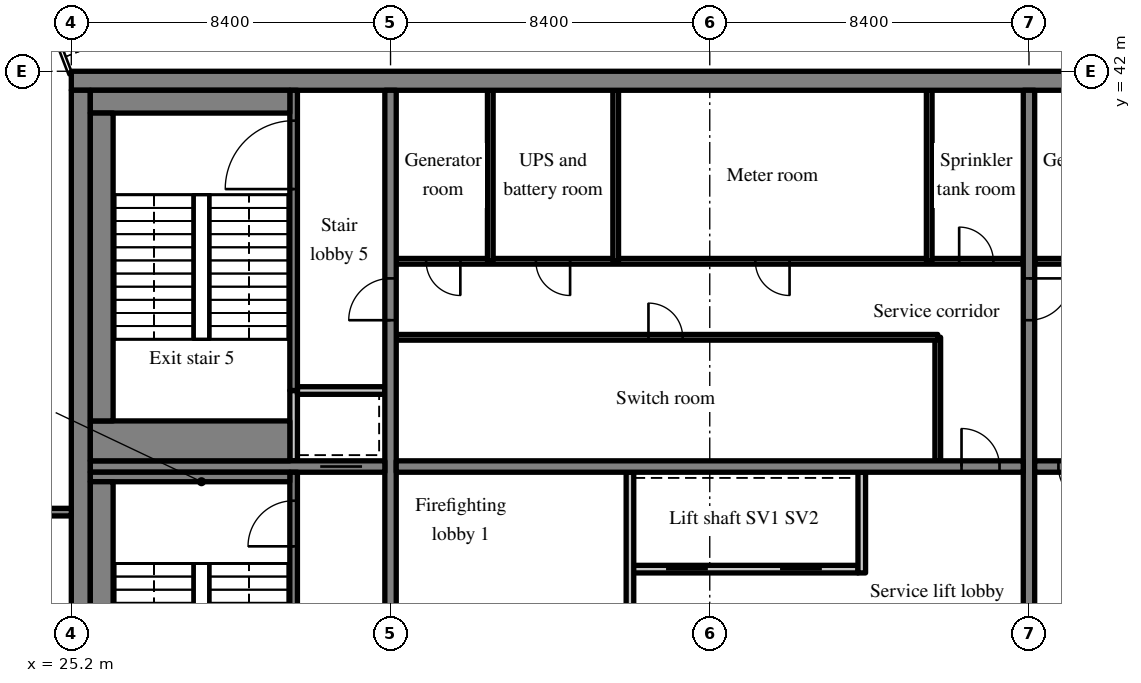
"""IFC4 building model, lengths in metres.
Left out: names, types, materials, properties, quantities, classifications, styles, units other than length and angle.
Written with IfcOpenShell. Run it as: python <this file> out.ifc"""

import sys

from ifc_helpers import new_model, si_unit, direction, frame, frame_2d, origin, place, context, subcontext, project, spatial, rectangle, extrude, source, transform, mapped, element, fill, save


model = new_model("IFC4")
c1 = context("Model", 3, precision=1e-05, world=origin(), true_north=direction((0.0, 1.0)))
c2 = subcontext(c1, "Body", "Model", "MODEL_VIEW")
j1 = project(units=[si_unit("LENGTHUNIT", "METRE"), si_unit("PLANEANGLEUNIT", "RADIAN")], contexts=[c1])
p1 = place(None, origin())
s1 = spatial("IfcSite", under=j1, at=p1, CompositionType="ELEMENT")
p2 = place(p1, origin())
s2 = spatial("IfcBuilding", under=s1, at=p2, CompositionType="ELEMENT")
p3 = place(p2, frame((0.0, 0.0, 317.7)))
s3 = spatial("IfcBuildingStorey", under=s2, at=p3, CompositionType="ELEMENT", Elevation=317.7)
m1 = source(origin(), c2, "Body", "SweptSolid", [
    extrude(rectangle(XDim=50.4, YDim=0.5, at=frame_2d((25.2, 0.0))), origin(), (0.0, 0.0, 1.0), 5.72),
])
p4 = place(p3, frame((25.2, 41.75, 0.0), z_axis=(0.0, 0.0, 1.0), x_axis=(1.0, 0.0, 0.0)))
e1 = element("IfcWall", 1, at=p4, inside=s3, PredefinedType="SHEAR", context=c2, shape_type="MappedRepresentation", body=[
    mapped(m1, transform((0.0, 0.0, 0.0), scale=1.0)),
])
m2 = source(origin(), c2, "Body", "SweptSolid", [
    extrude(rectangle(XDim=19.0, YDim=0.5, at=frame_2d((9.5, 0.0))), origin(), (0.0, 0.0, 1.0), 5.72),
])
p5 = place(p3, frame((25.45, 22.5, 0.0), z_axis=(0.0, 0.0, 1.0), x_axis=(0.0, 1.0, 0.0)))
e2 = element("IfcWall", 2, at=p5, inside=s3, PredefinedType="SHEAR", context=c2, shape_type="MappedRepresentation", body=[
    mapped(m2, transform((0.0, 0.0, 0.0), scale=1.0)),
])
m3 = source(origin(), c2, "Body", "SweptSolid", [
    extrude(rectangle(XDim=19.0, YDim=0.3, at=frame_2d((9.5, 0.0))), origin(), (0.0, 0.0, 1.0), 5.72),
])
p6 = place(p3, frame((33.6, 22.5, 0.0), z_axis=(0.0, 0.0, 1.0), x_axis=(0.0, 1.0, 0.0)))
e3 = element("IfcWall", 3, at=p6, inside=s3, PredefinedType="SHEAR", context=c2, shape_type="MappedRepresentation", body=[
    mapped(m3, transform((0.0, 0.0, 0.0), scale=1.0)),
])
m4 = source(origin(), c2, "Body", "SweptSolid", [
    extrude(rectangle(XDim=1.1, YDim=2.1, at=frame_2d((0.55, 1.05))), frame((0.0, 0.16, 0.0), z_axis=(0.0, -1.0, 0.0), x_axis=(1.0, 0.0, 0.0)), (0.0, 0.0, 1.0), 0.32),
])
p7 = place(p6, frame((12.95, 0.0, 0.0)))
e4 = element("IfcOpeningElement", 4, at=p7, cuts=e3, PredefinedType="OPENING", context=c2, shape_type="MappedRepresentation", body=[
    mapped(m4, transform((0.0, 0.0, 0.0), scale=1.0)),
])
p8 = place(p3, frame((50.4, 22.5, 0.0), z_axis=(0.0, 0.0, 1.0), x_axis=(0.0, 1.0, 0.0)))
e5 = element("IfcWall", 5, at=p8, inside=s3, PredefinedType="SHEAR", context=c2, shape_type="MappedRepresentation", body=[
    mapped(m3, transform((0.0, 0.0, 0.0), scale=1.0)),
])
p9 = place(p8, frame((12.95, 0.0, 0.0)))
e6 = element("IfcOpeningElement", 6, at=p9, cuts=e5, PredefinedType="OPENING", context=c2, shape_type="MappedRepresentation", body=[
    mapped(m4, transform((0.0, 0.0, 0.0), scale=1.0)),
])
m5 = source(origin(), c2, "Body", "SweptSolid", [
    extrude(rectangle(XDim=7.75, YDim=0.3, at=frame_2d((3.875, 0.0))), origin(), (0.0, 0.0, 1.0), 5.72),
])
p10 = place(p3, frame((25.7, 31.6, 0.0), z_axis=(0.0, 0.0, 1.0), x_axis=(1.0, 0.0, 0.0)))
e7 = element("IfcWall", 7, at=p10, inside=s3, PredefinedType="SHEAR", context=c2, shape_type="MappedRepresentation", body=[
    mapped(m5, transform((0.0, 0.0, 0.0), scale=1.0)),
])
p11 = place(p10, frame((6.05, 0.0, 0.0)))
e8 = element("IfcOpeningElement", 8, at=p11, cuts=e7, PredefinedType="OPENING", context=c2, shape_type="MappedRepresentation", body=[
    mapped(m4, transform((0.0, 0.0, 0.0), scale=1.0)),
])
m6 = source(origin(), c2, "Body", "SweptSolid", [
    extrude(rectangle(XDim=16.5, YDim=0.3, at=frame_2d((8.25, 0.0))), origin(), (0.0, 0.0, 1.0), 5.72),
])
p12 = place(p3, frame((33.75, 31.6, 0.0), z_axis=(0.0, 0.0, 1.0), x_axis=(1.0, 0.0, 0.0)))
e9 = element("IfcWall", 9, at=p12, inside=s3, PredefinedType="SHEAR", context=c2, shape_type="MappedRepresentation", body=[
    mapped(m6, transform((0.0, 0.0, 0.0), scale=1.0)),
])
m7 = source(origin(), c2, "Body", "SweptSolid", [
    extrude(rectangle(XDim=1.0, YDim=2.1, at=frame_2d((0.5, 1.05))), frame((0.0, 0.16, 0.0), z_axis=(0.0, -1.0, 0.0), x_axis=(1.0, 0.0, 0.0)), (0.0, 0.0, 1.0), 0.32),
])
p13 = place(p12, frame((14.875, 0.0, 0.0)))
e10 = element("IfcOpeningElement", 10, at=p13, cuts=e9, PredefinedType="OPENING", context=c2, shape_type="MappedRepresentation", body=[
    mapped(m7, transform((0.0, 0.0, 0.0), scale=1.0)),
])
p14 = place(p3, frame((50.55, 31.6, 0.0), z_axis=(0.0, 0.0, 1.0), x_axis=(1.0, 0.0, 0.0)))
e11 = element("IfcWall", 11, at=p14, inside=s3, PredefinedType="SHEAR", context=c2, shape_type="MappedRepresentation", body=[
    mapped(m6, transform((0.0, 0.0, 0.0), scale=1.0)),
])
p15 = place(p14, frame((0.625, 0.0, 0.0)))
e12 = element("IfcOpeningElement", 12, at=p15, cuts=e11, PredefinedType="OPENING", context=c2, shape_type="MappedRepresentation", body=[
    mapped(m7, transform((0.0, 0.0, 0.0), scale=1.0)),
])
m8 = source(origin(), c2, "Body", "SweptSolid", [
    extrude(rectangle(XDim=6.0, YDim=0.2, at=frame_2d((3.0, 0.0))), origin(), (0.0, 0.0, 1.0), 5.72),
])
p16 = place(p3, frame((39.9, 28.9, 0.0), z_axis=(0.0, 0.0, 1.0), x_axis=(1.0, 0.0, 0.0)))
e13 = element("IfcWall", 13, at=p16, inside=s3, PredefinedType="SOLIDWALL", context=c2, shape_type="MappedRepresentation", body=[
    mapped(m8, transform((0.0, 0.0, 0.0), scale=1.0)),
])
m9 = source(origin(), c2, "Body", "SweptSolid", [
    extrude(rectangle(XDim=1.1, YDim=2.1, at=frame_2d((0.55, 1.05))), frame((0.0, 0.11, 0.0), z_axis=(0.0, -1.0, 0.0), x_axis=(1.0, 0.0, 0.0)), (0.0, 0.0, 1.0), 0.22),
])
p17 = place(p16, frame((0.95, 0.0, 0.0)))
e14 = element("IfcOpeningElement", 14, at=p17, cuts=e13, PredefinedType="OPENING", context=c2, shape_type="MappedRepresentation", body=[
    mapped(m9, transform((0.0, 0.0, 0.0), scale=1.0)),
])
p18 = place(p16, frame((3.95, 0.0, 0.0)))
e15 = element("IfcOpeningElement", 15, at=p18, cuts=e13, PredefinedType="OPENING", context=c2, shape_type="MappedRepresentation", body=[
    mapped(m9, transform((0.0, 0.0, 0.0), scale=1.0)),
])
m10 = source(origin(), c2, "Body", "SweptSolid", [
    extrude(rectangle(XDim=8.95, YDim=0.2, at=frame_2d((4.475, 0.0))), origin(), (0.0, 0.0, 1.0), 5.72),
])
p19 = place(p3, frame((39.9, 22.5, 0.0), z_axis=(0.0, 0.0, 1.0), x_axis=(0.0, 1.0, 0.0)))
e16 = element("IfcWall", 16, at=p19, inside=s3, PredefinedType="PARTITIONING", context=c2, shape_type="MappedRepresentation", body=[
    mapped(m10, transform((0.0, 0.0, 0.0), scale=1.0)),
])
m11 = source(origin(), c2, "Body", "SweptSolid", [
    extrude(rectangle(XDim=0.9, YDim=2.1, at=frame_2d((0.45, 1.05))), frame((0.0, 0.11, 0.0), z_axis=(0.0, -1.0, 0.0), x_axis=(1.0, 0.0, 0.0)), (0.0, 0.0, 1.0), 0.22),
])
p20 = place(p19, frame((4.05, 0.0, 0.0)))
e17 = element("IfcOpeningElement", 17, at=p20, cuts=e16, PredefinedType="OPENING", context=c2, shape_type="MappedRepresentation", body=[
    mapped(m11, transform((0.0, 0.0, 0.0), scale=1.0)),
])
m12 = source(origin(), c2, "Body", "SweptSolid", [
    extrude(rectangle(XDim=2.65, YDim=0.2, at=frame_2d((1.325, 0.0))), origin(), (0.0, 0.0, 1.0), 5.72),
])
p21 = place(p3, frame((46.0, 28.8, 0.0), z_axis=(0.0, 0.0, 1.0), x_axis=(0.0, 1.0, 0.0)))
e18 = element("IfcWall", 18, at=p21, inside=s3, PredefinedType="SOLIDWALL", context=c2, shape_type="MappedRepresentation", body=[
    mapped(m12, transform((0.0, 0.0, 0.0), scale=1.0)),
])
m13 = source(origin(), c2, "Body", "SweptSolid", [
    extrude(rectangle(XDim=3.25, YDim=0.15, at=frame_2d((1.625, 0.0))), origin(), (0.0, 0.0, 1.0), 5.72),
])
p22 = place(p3, frame((48.0, 31.75, 0.0), z_axis=(0.0, 0.0, 1.0), x_axis=(0.0, 1.0, 0.0)))
e19 = element("IfcWall", 19, at=p22, inside=s3, PredefinedType="PARTITIONING", context=c2, shape_type="MappedRepresentation", body=[
    mapped(m13, transform((0.0, 0.0, 0.0), scale=1.0)),
])
m14 = source(origin(), c2, "Body", "SweptSolid", [
    extrude(rectangle(XDim=14.25, YDim=0.15, at=frame_2d((7.125, 0.0))), origin(), (0.0, 0.0, 1.0), 5.72),
])
p23 = place(p3, frame((33.75, 35.0, 0.0), z_axis=(0.0, 0.0, 1.0), x_axis=(1.0, 0.0, 0.0)))
e20 = element("IfcWall", 20, at=p23, inside=s3, PredefinedType="PARTITIONING", context=c2, shape_type="MappedRepresentation", body=[
    mapped(m14, transform((0.0, 0.0, 0.0), scale=1.0)),
])
m15 = source(origin(), c2, "Body", "SweptSolid", [
    extrude(rectangle(XDim=0.9, YDim=2.1, at=frame_2d((0.45, 1.05))), frame((0.0, 0.085, 0.0), z_axis=(0.0, -1.0, 0.0), x_axis=(1.0, 0.0, 0.0)), (0.0, 0.0, 1.0), 0.17),
])
p24 = place(p23, frame((6.637, 0.0, 0.0)))
e21 = element("IfcOpeningElement", 21, at=p24, cuts=e20, PredefinedType="OPENING", context=c2, shape_type="MappedRepresentation", body=[
    mapped(m15, transform((0.0, 0.0, 0.0), scale=1.0)),
])
m16 = source(origin(), c2, "Body", "SweptSolid", [
    extrude(rectangle(XDim=16.5, YDim=0.15, at=frame_2d((8.25, 0.0))), origin(), (0.0, 0.0, 1.0), 5.72),
])
p25 = place(p3, frame((33.75, 37.0, 0.0), z_axis=(0.0, 0.0, 1.0), x_axis=(1.0, 0.0, 0.0)))
e22 = element("IfcWall", 22, at=p25, inside=s3, PredefinedType="PARTITIONING", context=c2, shape_type="MappedRepresentation", body=[
    mapped(m16, transform((0.0, 0.0, 0.0), scale=1.0)),
])
p26 = place(p25, frame((0.787, 0.0, 0.0)))
e23 = element("IfcOpeningElement", 23, at=p26, cuts=e22, PredefinedType="OPENING", context=c2, shape_type="MappedRepresentation", body=[
    mapped(m15, transform((0.0, 0.0, 0.0), scale=1.0)),
])
p27 = place(p25, frame((3.675, 0.0, 0.0)))
e24 = element("IfcOpeningElement", 24, at=p27, cuts=e22, PredefinedType="OPENING", context=c2, shape_type="MappedRepresentation", body=[
    mapped(m15, transform((0.0, 0.0, 0.0), scale=1.0)),
])
p28 = place(p25, frame((9.45, 0.0, 0.0)))
e25 = element("IfcOpeningElement", 25, at=p28, cuts=e22, PredefinedType="OPENING", context=c2, shape_type="MappedRepresentation", body=[
    mapped(m15, transform((0.0, 0.0, 0.0), scale=1.0)),
])
p29 = place(p25, frame((14.813, 0.0, 0.0)))
e26 = element("IfcOpeningElement", 26, at=p29, cuts=e22, PredefinedType="OPENING", context=c2, shape_type="MappedRepresentation", body=[
    mapped(m15, transform((0.0, 0.0, 0.0), scale=1.0)),
])
m17 = source(origin(), c2, "Body", "SweptSolid", [
    extrude(rectangle(XDim=4.5, YDim=0.15, at=frame_2d((2.25, 0.0))), origin(), (0.0, 0.0, 1.0), 5.72),
])
for number, where, z_axis, x_axis in (
    (27, (36.225, 37.0, 0.0), (0.0, 0.0, 1.0), (0.0, 1.0, 0.0)),
    (28, (39.525, 37.0, 0.0), (0.0, 0.0, 1.0), (0.0, 1.0, 0.0)),
    (29, (47.775, 37.0, 0.0), (0.0, 0.0, 1.0), (0.0, 1.0, 0.0)),
):
    element("IfcWall", number, at=place(p3, frame(where, z_axis=z_axis, x_axis=x_axis)), inside=s3, PredefinedType="PARTITIONING", context=c2, shape_type="MappedRepresentation", body=[
        mapped(m17, transform((0.0, 0.0, 0.0), scale=1.0)),
    ])
p30 = place(p3, frame((67.05, 37.0, 0.0), z_axis=(0.0, 0.0, 1.0), x_axis=(-1.0, 0.0, 0.0)))
e30 = element("IfcWall", 30, at=p30, inside=s3, PredefinedType="PARTITIONING", context=c2, shape_type="MappedRepresentation", body=[
    mapped(m16, transform((0.0, 0.0, 0.0), scale=1.0)),
])
p31 = place(p30, frame((6.563, 0.0, 0.0)))
e31 = element("IfcOpeningElement", 31, at=p31, cuts=e30, PredefinedType="OPENING", context=c2, shape_type="MappedRepresentation", body=[
    mapped(m15, transform((0.0, 0.0, 0.0), scale=1.0)),
])
p32 = place(p30, frame((14.813, 0.0, 0.0)))
e32 = element("IfcOpeningElement", 32, at=p32, cuts=e30, PredefinedType="OPENING", context=c2, shape_type="MappedRepresentation", body=[
    mapped(m15, transform((0.0, 0.0, 0.0), scale=1.0)),
])
m18 = source(origin(), c2, "Body", "SweptSolid", [
    extrude(rectangle(XDim=8.95, YDim=0.2, at=frame_2d((4.475, 0.0))), origin(), (0.0, 0.0, 1.0), 5.72),
])
p33 = place(p3, frame((31.05, 22.5, 0.0), z_axis=(0.0, 0.0, 1.0), x_axis=(0.0, 1.0, 0.0)))
e33 = element("IfcWall", 33, at=p33, inside=s3, PredefinedType="SOLIDWALL", context=c2, shape_type="MappedRepresentation", body=[
    mapped(m18, transform((0.0, 0.0, 0.0), scale=1.0)),
])
m19 = source(origin(), c2, "Body", "SweptSolid", [
    extrude(rectangle(XDim=1.2, YDim=2.1, at=frame_2d((0.6, 1.05))), frame((0.0, 0.11, 0.0), z_axis=(0.0, -1.0, 0.0), x_axis=(1.0, 0.0, 0.0)), (0.0, 0.0, 1.0), 0.22),
])
p34 = place(p33, frame((7.0, 0.0, 0.0)))
e34 = element("IfcOpeningElement", 34, at=p34, cuts=e33, PredefinedType="OPENING", context=c2, shape_type="MappedRepresentation", body=[
    mapped(m19, transform((0.0, 0.0, 0.0), scale=1.0)),
])
m20 = source(origin(), c2, "Body", "SweptSolid", [
    extrude(rectangle(XDim=1.85, YDim=0.2, at=frame_2d((0.925, 0.0))), origin(), (0.0, 0.0, 1.0), 5.72),
])
p35 = place(p3, frame((31.05, 31.75, 0.0), z_axis=(0.0, 0.0, 1.0), x_axis=(0.0, 1.0, 0.0)))
e35 = element("IfcWall", 35, at=p35, inside=s3, PredefinedType="SOLIDWALL", context=c2, shape_type="MappedRepresentation", body=[
    mapped(m20, transform((0.0, 0.0, 0.0), scale=1.0)),
])
m21 = source(origin(), c2, "Body", "SweptSolid", [
    extrude(rectangle(XDim=2.3, YDim=0.2, at=frame_2d((1.15, 0.0))), origin(), (0.0, 0.0, 1.0), 5.72),
])
p36 = place(p3, frame((31.15, 33.6, 0.0), z_axis=(0.0, 0.0, 1.0), x_axis=(1.0, 0.0, 0.0)))
e36 = element("IfcWall", 36, at=p36, inside=s3, PredefinedType="SOLIDWALL", context=c2, shape_type="MappedRepresentation", body=[
    mapped(m21, transform((0.0, 0.0, 0.0), scale=1.0)),
])
m22 = source(origin(), c2, "Body", "SweptSolid", [
    extrude(rectangle(XDim=7.9, YDim=0.2, at=frame_2d((3.95, 0.0))), origin(), (0.0, 0.0, 1.0), 5.72),
])
p37 = place(p3, frame((31.05, 33.6, 0.0), z_axis=(0.0, 0.0, 1.0), x_axis=(0.0, 1.0, 0.0)))
e37 = element("IfcWall", 37, at=p37, inside=s3, PredefinedType="SOLIDWALL", context=c2, shape_type="MappedRepresentation", body=[
    mapped(m22, transform((0.0, 0.0, 0.0), scale=1.0)),
])
m23 = source(origin(), c2, "Body", "SweptSolid", [
    extrude(rectangle(XDim=1.8, YDim=2.1, at=frame_2d((0.9, 1.05))), frame((0.0, 0.11, 0.0), z_axis=(0.0, -1.0, 0.0), x_axis=(1.0, 0.0, 0.0)), (0.0, 0.0, 1.0), 0.22),
])
p38 = place(p37, frame((5.3, 0.0, 0.0)))
e38 = element("IfcOpeningElement", 38, at=p38, cuts=e37, PredefinedType="OPENING", context=c2, shape_type="MappedRepresentation", body=[
    mapped(m23, transform((0.0, 0.0, 0.0), scale=1.0)),
])
m24 = source(origin(), c2, "Body", "SweptSolid", [
    extrude(rectangle(XDim=8.15, YDim=0.2, at=frame_2d((4.075, 0.0))), origin(), (0.0, 0.0, 1.0), 5.72),
])
p39 = place(p3, frame((17.05, 30.4, 0.0), z_axis=(0.0, 0.0, 1.0), x_axis=(1.0, 0.0, 0.0)))
e39 = element("IfcWall", 39, at=p39, inside=s3, PredefinedType="SOLIDWALL", context=c2, shape_type="MappedRepresentation", body=[
    mapped(m24, transform((0.0, 0.0, 0.0), scale=1.0)),
])
m25 = source(origin(), c2, "Body", "SweptSolid", [
    extrude(rectangle(XDim=1.0, YDim=2.1, at=frame_2d((0.5, 1.05))), frame((0.0, 0.11, 0.0), z_axis=(0.0, -1.0, 0.0), x_axis=(1.0, 0.0, 0.0)), (0.0, 0.0, 1.0), 0.22),
])
p40 = place(p39, frame((6.05, 0.0, 0.0)))
e40 = element("IfcOpeningElement", 40, at=p40, cuts=e39, PredefinedType="OPENING", context=c2, shape_type="MappedRepresentation", body=[
    mapped(m25, transform((0.0, 0.0, 0.0), scale=1.0)),
])
m26 = source(origin(), c2, "Body", "SweptSolid", [
    extrude(rectangle(XDim=5.25, YDim=0.25, at=frame_2d((2.625, 0.0))), origin(), (0.0, 0.0, 1.0), 5.72),
])
p41 = place(p3, frame((25.7, 31.325, 0.0), z_axis=(0.0, 0.0, 1.0), x_axis=(1.0, 0.0, 0.0)))
e41 = element("IfcWall", 41, at=p41, inside=s3, PredefinedType="SOLIDWALL", context=c2, shape_type="MappedRepresentation", body=[
    mapped(m26, transform((0.0, 0.0, 0.0), scale=1.0)),
])
m27 = source(origin(), c2, "Body", "SweptSolid", [
    extrude(rectangle(XDim=8.1, YDim=0.6, at=frame_2d((4.05, 0.0))), origin(), (0.0, 0.0, 1.0), 5.72),
])
p42 = place(p3, frame((26.0, 23.1, 0.0), z_axis=(0.0, 0.0, 1.0), x_axis=(0.0, 1.0, 0.0)))
e42 = element("IfcWall", 42, at=p42, inside=s3, PredefinedType="SOLIDWALL", context=c2, shape_type="MappedRepresentation", body=[
    mapped(m27, transform((0.0, 0.0, 0.0), scale=1.0)),
])
m28 = source(origin(), c2, "Body", "SweptSolid", [
    extrude(rectangle(XDim=5.25, YDim=0.6, at=frame_2d((2.625, 0.0))), origin(), (0.0, 0.0, 1.0), 5.72),
])
p43 = place(p3, frame((25.7, 41.2, 0.0), z_axis=(0.0, 0.0, 1.0), x_axis=(1.0, 0.0, 0.0)))
e43 = element("IfcWall", 43, at=p43, inside=s3, PredefinedType="SOLIDWALL", context=c2, shape_type="MappedRepresentation", body=[
    mapped(m28, transform((0.0, 0.0, 0.0), scale=1.0)),
])
m29 = source(origin(), c2, "Body", "SweptSolid", [
    extrude(rectangle(XDim=5.25, YDim=1.05, at=frame_2d((2.625, 0.0))), origin(), (0.0, 0.0, 1.0), 5.72),
])
p44 = place(p3, frame((25.7, 32.275, 0.0), z_axis=(0.0, 0.0, 1.0), x_axis=(1.0, 0.0, 0.0)))
e44 = element("IfcWall", 44, at=p44, inside=s3, PredefinedType="SOLIDWALL", context=c2, shape_type="MappedRepresentation", body=[
    mapped(m29, transform((0.0, 0.0, 0.0), scale=1.0)),
])
p45 = place(p3, frame((26.0, 32.8, 0.0), z_axis=(0.0, 0.0, 1.0), x_axis=(0.0, 1.0, 0.0)))
e45 = element("IfcWall", 45, at=p45, inside=s3, PredefinedType="SOLIDWALL", context=c2, shape_type="MappedRepresentation", body=[
    mapped(m27, transform((0.0, 0.0, 0.0), scale=1.0)),
])
m30 = source(origin(), c2, "Body", "SweptSolid", [
    extrude(rectangle(XDim=1.0, YDim=2.1, at=frame_2d((0.5, 1.05))), frame((0.0, 0.025, 0.0), z_axis=(0.0, -1.0, 0.0), x_axis=(1.0, 0.0, 0.0)), (0.0, 0.0, 1.0), 0.05),
])
p46 = place(p13, origin())
e46 = element("IfcDoor", 46, at=p46, inside=s3, OperationType="SINGLE_SWING_LEFT", PredefinedType="DOOR", context=c2, shape_type="MappedRepresentation", body=[
    mapped(m30, transform((0.0, 0.0, 0.0), scale=1.0)),
])
fill(e10, e46)
m31 = source(origin(), c2, "Body", "SweptSolid", [
    extrude(rectangle(XDim=1.1, YDim=2.1, at=frame_2d((0.55, 1.05))), frame((0.0, 0.025, 0.0), z_axis=(0.0, -1.0, 0.0), x_axis=(1.0, 0.0, 0.0)), (0.0, 0.0, 1.0), 0.05),
])
p47 = place(p17, origin())
e47 = element("IfcDoor", 47, at=p47, inside=s3, OperationType="SLIDING_TO_LEFT", PredefinedType="DOOR", context=c2, shape_type="MappedRepresentation", body=[
    mapped(m31, transform((0.0, 0.0, 0.0), scale=1.0)),
])
fill(e14, e47)
p48 = place(p18, origin())
e48 = element("IfcDoor", 48, at=p48, inside=s3, OperationType="SLIDING_TO_RIGHT", PredefinedType="DOOR", context=c2, shape_type="MappedRepresentation", body=[
    mapped(m31, transform((0.0, 0.0, 0.0), scale=1.0)),
])
fill(e15, e48)
m32 = source(origin(), c2, "Body", "SweptSolid", [
    extrude(rectangle(XDim=0.9, YDim=2.1, at=frame_2d((0.45, 1.05))), frame((0.0, 0.025, 0.0), z_axis=(0.0, -1.0, 0.0), x_axis=(1.0, 0.0, 0.0)), (0.0, 0.0, 1.0), 0.05),
])
p49 = place(p24, origin())
e49 = element("IfcDoor", 49, at=p49, inside=s3, OperationType="SINGLE_SWING_LEFT", PredefinedType="DOOR", context=c2, shape_type="MappedRepresentation", body=[
    mapped(m32, transform((0.0, 0.0, 0.0), scale=1.0)),
])
fill(e21, e49)
p50 = place(p26, origin())
e50 = element("IfcDoor", 50, at=p50, inside=s3, OperationType="SINGLE_SWING_RIGHT", PredefinedType="DOOR", context=c2, shape_type="MappedRepresentation", body=[
    mapped(m32, transform((0.0, 0.0, 0.0), scale=1.0)),
])
fill(e23, e50)
p51 = place(p27, origin())
e51 = element("IfcDoor", 51, at=p51, inside=s3, OperationType="SINGLE_SWING_RIGHT", PredefinedType="DOOR", context=c2, shape_type="MappedRepresentation", body=[
    mapped(m32, transform((0.0, 0.0, 0.0), scale=1.0)),
])
fill(e24, e51)
p52 = place(p28, origin())
e52 = element("IfcDoor", 52, at=p52, inside=s3, OperationType="SINGLE_SWING_RIGHT", PredefinedType="DOOR", context=c2, shape_type="MappedRepresentation", body=[
    mapped(m32, transform((0.0, 0.0, 0.0), scale=1.0)),
])
fill(e25, e52)
p53 = place(p29, origin())
e53 = element("IfcDoor", 53, at=p53, inside=s3, OperationType="SINGLE_SWING_LEFT", PredefinedType="DOOR", context=c2, shape_type="MappedRepresentation", body=[
    mapped(m32, transform((0.0, 0.0, 0.0), scale=1.0)),
])
fill(e26, e53)
p54 = place(p15, origin())
e54 = element("IfcDoor", 54, at=p54, inside=s3, OperationType="SINGLE_SWING_RIGHT", PredefinedType="DOOR", context=c2, shape_type="MappedRepresentation", body=[
    mapped(m30, transform((0.0, 0.0, 0.0), scale=1.0)),
])
fill(e12, e54)
m33 = source(origin(), c2, "Body", "SweptSolid", [
    extrude(rectangle(XDim=1.2, YDim=2.1, at=frame_2d((0.6, 1.05))), frame((0.0, 0.025, 0.0), z_axis=(0.0, -1.0, 0.0), x_axis=(1.0, 0.0, 0.0)), (0.0, 0.0, 1.0), 0.05),
])
p55 = place(p34, origin())
e55 = element("IfcDoor", 55, at=p55, inside=s3, OperationType="SINGLE_SWING_LEFT", PredefinedType="DOOR", context=c2, shape_type="MappedRepresentation", body=[
    mapped(m33, transform((0.0, 0.0, 0.0), scale=1.0)),
])
fill(e34, e55)
p56 = place(p11, origin())
e56 = element("IfcDoor", 56, at=p56, inside=s3, OperationType="SLIDING_TO_RIGHT", PredefinedType="DOOR", context=c2, shape_type="MappedRepresentation", body=[
    mapped(m31, transform((0.0, 0.0, 0.0), scale=1.0)),
])
fill(e8, e56)
m34 = source(origin(), c2, "Body", "SweptSolid", [
    extrude(rectangle(XDim=1.8, YDim=2.1, at=frame_2d((0.9, 1.05))), frame((0.0, 0.025, 0.0), z_axis=(0.0, -1.0, 0.0), x_axis=(1.0, 0.0, 0.0)), (0.0, 0.0, 1.0), 0.05),
])
p57 = place(p38, origin())
e57 = element("IfcDoor", 57, at=p57, inside=s3, OperationType="SINGLE_SWING_LEFT", PredefinedType="DOOR", context=c2, shape_type="MappedRepresentation", body=[
    mapped(m34, transform((0.0, 0.0, 0.0), scale=1.0)),
])
fill(e38, e57)
p58 = place(p7, origin())
e58 = element("IfcDoor", 58, at=p58, inside=s3, OperationType="SINGLE_SWING_LEFT", PredefinedType="DOOR", context=c2, shape_type="MappedRepresentation", body=[
    mapped(m31, transform((0.0, 0.0, 0.0), scale=1.0)),
])
fill(e4, e58)
p59 = place(p9, origin())
e59 = element("IfcDoor", 59, at=p59, inside=s3, OperationType="SINGLE_SWING_RIGHT", PredefinedType="DOOR", context=c2, shape_type="MappedRepresentation", body=[
    mapped(m31, transform((0.0, 0.0, 0.0), scale=1.0)),
])
fill(e6, e59)
save(model, sys.argv[1])
